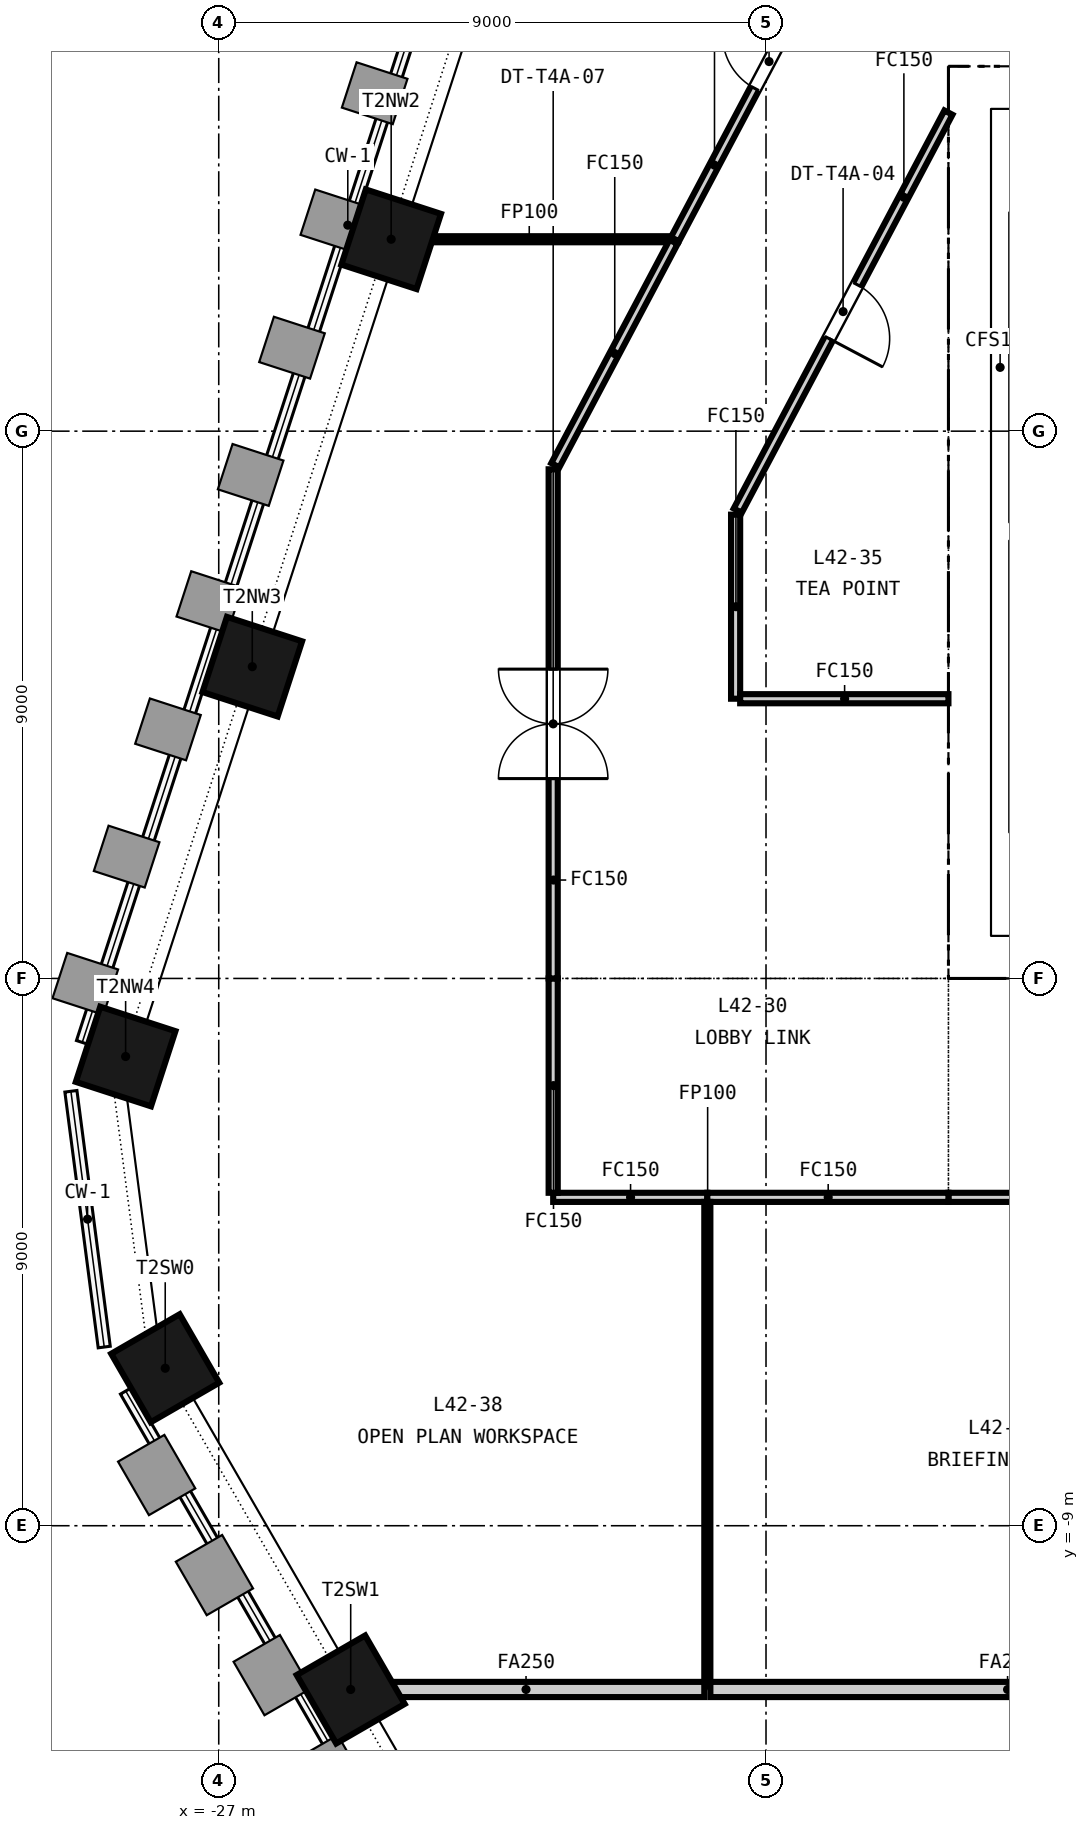
"""IFC4 building model, lengths in metres.
Left out: names, types, materials, properties, quantities, classifications, styles, units other than length and angle.
Written with IfcOpenShell. Run it as: python <this file> out.ifc"""

import sys

from ifc_helpers import new_model, si_unit, direction, frame, frame_2d, origin, origin_2d, place, context, subcontext, project, spatial, rectangle, extrude, element, fill, save


model = new_model("IFC4")
c1 = context("Model", 3, precision=1e-05, world=origin(), true_north=direction((0.0, 1.0)))
c2 = subcontext(c1, "Body", "Model", "MODEL_VIEW")
j1 = project(units=[si_unit("LENGTHUNIT", "METRE"), si_unit("PLANEANGLEUNIT", "RADIAN")], contexts=[c1])
p1 = place(None, origin())
s1 = spatial("IfcSite", under=j1, at=p1, CompositionType="ELEMENT")
p2 = place(p1, origin())
s2 = spatial("IfcBuilding", under=s1, at=p2, CompositionType="ELEMENT")
p3 = place(p2, frame((0.0, 0.0, 170.8)))
s3 = spatial("IfcBuildingStorey", under=s2, at=p3, CompositionType="ELEMENT", Elevation=170.8)
p4 = place(p3, frame((-15.0, 0.35, -0.15), z_axis=(0.0, 0.0, 1.0), x_axis=(1.0, 0.0, 0.0)))
e1 = element("IfcWall", 1, at=p4, inside=s3, PredefinedType="SOLIDWALL", context=c2, shape_type="SweptSolid", body=[
    extrude(rectangle(XDim=30.0, YDim=0.7, at=frame_2d((15.0, 0.0))), origin(), (0.0, 0.0, 1.0), 3.65),
])
p5 = place(p4, frame((5.8, 0.0, 0.15)))
e2 = element("IfcOpeningElement", 2, at=p5, cuts=e1, PredefinedType="OPENING", context=c2, shape_type="SweptSolid", body=[
    extrude(rectangle(XDim=2.4, YDim=2.4, at=frame_2d((1.2, 1.2))), frame((0.0, 0.36, 0.0), z_axis=(0.0, -1.0, 0.0), x_axis=(1.0, 0.0, 0.0)), (0.0, 0.0, 1.0), 0.72),
])
p6 = place(p4, frame((13.8, 0.0, 0.15)))
e3 = element("IfcOpeningElement", 3, at=p6, cuts=e1, PredefinedType="OPENING", context=c2, shape_type="SweptSolid", body=[
    extrude(rectangle(XDim=2.4, YDim=2.4, at=frame_2d((1.2, 1.2))), frame((0.0, 0.36, 0.0), z_axis=(0.0, -1.0, 0.0), x_axis=(1.0, 0.0, 0.0)), (0.0, 0.0, 1.0), 0.72),
])
p7 = place(p4, frame((21.8, 0.0, 0.15)))
e4 = element("IfcOpeningElement", 4, at=p7, cuts=e1, PredefinedType="OPENING", context=c2, shape_type="SweptSolid", body=[
    extrude(rectangle(XDim=2.4, YDim=2.4, at=frame_2d((1.2, 1.2))), frame((0.0, 0.36, 0.0), z_axis=(0.0, -1.0, 0.0), x_axis=(1.0, 0.0, 0.0)), (0.0, 0.0, 1.0), 0.72),
])
p8 = place(p4, frame((1.5, 0.0, 0.15)))
e5 = element("IfcOpeningElement", 5, at=p8, cuts=e1, PredefinedType="OPENING", context=c2, shape_type="SweptSolid", body=[
    extrude(rectangle(XDim=1.2, YDim=2.1, at=frame_2d((0.6, 1.05))), frame((0.0, 0.36, 0.0), z_axis=(0.0, -1.0, 0.0), x_axis=(1.0, 0.0, 0.0)), (0.0, 0.0, 1.0), 0.72),
])
p9 = place(p4, frame((27.3, 0.0, 0.15)))
e6 = element("IfcOpeningElement", 6, at=p9, cuts=e1, PredefinedType="OPENING", context=c2, shape_type="SweptSolid", body=[
    extrude(rectangle(XDim=1.2, YDim=2.1, at=frame_2d((0.6, 1.05))), frame((0.0, 0.36, 0.0), z_axis=(0.0, -1.0, 0.0), x_axis=(1.0, 0.0, 0.0)), (0.0, 0.0, 1.0), 0.72),
])
p10 = place(p3, frame((-15.0, 14.65, -0.15), z_axis=(0.0, 0.0, 1.0), x_axis=(1.0, 0.0, 0.0)))
e7 = element("IfcWall", 7, at=p10, inside=s3, PredefinedType="SOLIDWALL", context=c2, shape_type="SweptSolid", body=[
    extrude(rectangle(XDim=30.0, YDim=0.7, at=frame_2d((15.0, 0.0))), origin(), (0.0, 0.0, 1.0), 3.65),
])
p11 = place(p10, frame((9.25, 0.0, 0.15)))
e8 = element("IfcOpeningElement", 8, at=p11, cuts=e7, PredefinedType="OPENING", context=c2, shape_type="SweptSolid", body=[
    extrude(rectangle(XDim=1.5, YDim=2.1, at=frame_2d((0.75, 1.05))), frame((0.0, 0.36, 0.0), z_axis=(0.0, -1.0, 0.0), x_axis=(1.0, 0.0, 0.0)), (0.0, 0.0, 1.0), 0.72),
])
p12 = place(p10, frame((19.4, 0.0, 0.15)))
e9 = element("IfcOpeningElement", 9, at=p12, cuts=e7, PredefinedType="OPENING", context=c2, shape_type="SweptSolid", body=[
    extrude(rectangle(XDim=1.5, YDim=2.1, at=frame_2d((0.75, 1.05))), frame((0.0, 0.36, 0.0), z_axis=(0.0, -1.0, 0.0), x_axis=(1.0, 0.0, 0.0)), (0.0, 0.0, 1.0), 0.72),
])
p13 = place(p10, frame((1.5, 0.0, 0.15)))
e10 = element("IfcOpeningElement", 10, at=p13, cuts=e7, PredefinedType="OPENING", context=c2, shape_type="SweptSolid", body=[
    extrude(rectangle(XDim=1.2, YDim=2.1, at=frame_2d((0.6, 1.05))), frame((0.0, 0.36, 0.0), z_axis=(0.0, -1.0, 0.0), x_axis=(1.0, 0.0, 0.0)), (0.0, 0.0, 1.0), 0.72),
])
p14 = place(p10, frame((27.3, 0.0, 0.15)))
e11 = element("IfcOpeningElement", 11, at=p14, cuts=e7, PredefinedType="OPENING", context=c2, shape_type="SweptSolid", body=[
    extrude(rectangle(XDim=1.2, YDim=2.1, at=frame_2d((0.6, 1.05))), frame((0.0, 0.36, 0.0), z_axis=(0.0, -1.0, 0.0), x_axis=(1.0, 0.0, 0.0)), (0.0, 0.0, 1.0), 0.72),
])
p15 = place(p3, frame((-14.65, 0.7, -0.15), z_axis=(0.0, 0.0, 1.0), x_axis=(0.0, 1.0, 0.0)))
e12 = element("IfcWall", 12, at=p15, inside=s3, PredefinedType="SOLIDWALL", context=c2, shape_type="SweptSolid", body=[
    extrude(rectangle(XDim=13.6, YDim=0.7, at=frame_2d((6.8, 0.0))), origin(), (0.0, 0.0, 1.0), 3.65),
])
for number, where, z_axis, x_axis in (
    (13, (-24.164, 12.156, -0.15), (0.0, 0.0, 1.0), (-0.309, -0.951, 0.0)),
    (14, (-26.448, 5.127, -0.15), (0.0, 0.0, 1.0), (-0.309, -0.951, 0.0)),
    (15, (-28.531, -1.284, -0.15), (0.0, 0.0, 1.0), (-0.309, -0.951, 0.0)),
    (16, (-27.88, -6.41, -0.15), (0.0, 0.0, 1.0), (0.5, -0.866, 0.0)),
    (17, (-24.83, -11.693, -0.15), (0.0, 0.0, 1.0), (0.5, -0.866, 0.0)),
):
    element("IfcColumn", number, at=place(p3, frame(where, z_axis=z_axis, x_axis=x_axis)), inside=s3, PredefinedType="COLUMN", context=c2, shape_type="SweptSolid", body=[
        extrude(rectangle(XDim=1.3, YDim=1.3, at=origin_2d()), origin(), (0.0, 0.0, 1.0), 3.65),
    ])
p16 = place(p3, frame((-14.15, 0.7, 0.0), z_axis=(0.0, 0.0, 1.0), x_axis=(0.0, 1.0, 0.0)))
e18 = element("IfcWall", 18, at=p16, inside=s3, PredefinedType="SOLIDWALL", context=c2, shape_type="SweptSolid", body=[
    extrude(rectangle(XDim=13.6, YDim=0.3, at=frame_2d((6.8, 0.0))), origin(), (0.0, 0.0, 1.0), 3.5),
])
p17 = place(p3, frame((9.15, -3.6, 0.0), z_axis=(0.0, 0.0, 1.0), x_axis=(-1.0, 0.0, 0.0)))
e19 = element("IfcWall", 19, at=p17, inside=s3, PredefinedType="PARTITIONING", context=c2, shape_type="SweptSolid", body=[
    extrude(rectangle(XDim=24.15, YDim=0.15, at=frame_2d((12.075, 0.0))), origin(), (0.0, 0.0, 1.0), 2.741),
])
p18 = place(p17, frame((11.175, 0.0, 0.0)))
e20 = element("IfcOpeningElement", 20, at=p18, cuts=e19, PredefinedType="OPENING", context=c2, shape_type="SweptSolid", body=[
    extrude(rectangle(XDim=1.8, YDim=2.1, at=frame_2d((0.9, 1.05))), frame((0.0, 0.085, 0.0), z_axis=(0.0, -1.0, 0.0), x_axis=(1.0, 0.0, 0.0)), (0.0, 0.0, 1.0), 0.17),
])
p19 = place(p3, frame((-18.965, -3.6, 0.0), z_axis=(0.0, 0.0, 1.0), x_axis=(-1.0, 0.0, 0.0)))
e21 = element("IfcWall", 21, at=p19, inside=s3, PredefinedType="PARTITIONING", context=c2, shape_type="SweptSolid", body=[
    extrude(rectangle(XDim=2.535, YDim=0.15, at=frame_2d((1.268, 0.0))), origin(), (0.0, 0.0, 1.0), 2.741),
])
p20 = place(p3, frame((-15.0, -3.6, 0.0), z_axis=(0.0, 0.0, 1.0), x_axis=(-1.0, 0.0, 0.0)))
e22 = element("IfcWall", 22, at=p20, inside=s3, PredefinedType="PARTITIONING", context=c2, shape_type="SweptSolid", body=[
    extrude(rectangle(XDim=3.965, YDim=0.15, at=frame_2d((1.982, 0.0))), origin(), (0.0, 0.0, 1.0), 2.741),
])
p21 = place(p3, frame((-18.5, 7.627, 0.0), z_axis=(0.0, 0.0, 1.0), x_axis=(0.0, -1.0, 0.0)))
e23 = element("IfcWall", 23, at=p21, inside=s3, PredefinedType="PARTITIONING", context=c2, shape_type="SweptSolid", body=[
    extrude(rectangle(XDim=3.027, YDim=0.15, at=frame_2d((1.513, 0.0))), origin(), (0.0, 0.0, 1.0), 2.741),
])
p22 = place(p3, frame((-15.0, 14.239, 0.0), z_axis=(0.0, 0.0, 1.0), x_axis=(-0.467834708812, -0.88381597928, 0.0)))
e24 = element("IfcWall", 24, at=p22, inside=s3, PredefinedType="PARTITIONING", context=c2, shape_type="SweptSolid", body=[
    extrude(rectangle(XDim=7.406, YDim=0.15, at=frame_2d((3.703, 0.0))), origin(), (0.0, 0.0, 1.0), 2.741),
])
p23 = place(p22, frame((3.203, 0.0, 0.0)))
e25 = element("IfcOpeningElement", 25, at=p23, cuts=e24, PredefinedType="OPENING", context=c2, shape_type="SweptSolid", body=[
    extrude(rectangle(XDim=1.0, YDim=2.1, at=frame_2d((0.5, 1.05))), frame((0.0, 0.085, 0.0), z_axis=(0.0, -1.0, 0.0), x_axis=(1.0, 0.0, 0.0)), (0.0, 0.0, 1.0), 0.17),
])
p24 = place(p3, frame((-19.497, 12.156, 0.0), z_axis=(0.0, 0.0, 1.0), x_axis=(0.467901291368, 0.883780731593, 0.0)))
e26 = element("IfcWall", 26, at=p24, inside=s3, PredefinedType="PARTITIONING", context=c2, shape_type="SweptSolid", body=[
    extrude(rectangle(XDim=6.613, YDim=0.15, at=frame_2d((3.306, 0.0))), origin(), (0.0, 0.0, 1.0), 2.741),
])
p25 = place(p24, frame((2.806, 0.0, 0.0)))
e27 = element("IfcOpeningElement", 27, at=p25, cuts=e26, PredefinedType="OPENING", context=c2, shape_type="SweptSolid", body=[
    extrude(rectangle(XDim=1.0, YDim=2.1, at=frame_2d((0.5, 1.05))), frame((0.0, 0.085, 0.0), z_axis=(0.0, -1.0, 0.0), x_axis=(1.0, 0.0, 0.0)), (0.0, 0.0, 1.0), 0.17),
])
p26 = place(p3, frame((-24.217, 12.156, 0.0), z_axis=(0.0, 0.0, 1.0), x_axis=(1.0, 0.0, 0.0)))
e28 = element("IfcWall", 28, at=p26, inside=s3, PredefinedType="PARTITIONING", context=c2, shape_type="SweptSolid", body=[
    extrude(rectangle(XDim=4.637, YDim=0.1, at=frame_2d((2.318, 0.0))), origin(), (0.0, 0.0, 1.0), 2.741),
])
p27 = place(p3, frame((-18.425, 4.6, 0.0), z_axis=(0.0, 0.0, 1.0), x_axis=(1.0, 0.0, 0.0)))
e29 = element("IfcWall", 29, at=p27, inside=s3, PredefinedType="PARTITIONING", context=c2, shape_type="SweptSolid", body=[
    extrude(rectangle(XDim=3.425, YDim=0.15, at=frame_2d((1.712, 0.0))), origin(), (0.0, 0.0, 1.0), 2.741),
])
p28 = place(p3, frame((-21.5, -3.525, 0.0), z_axis=(0.0, 0.0, 1.0), x_axis=(0.0, 1.0, 0.0)))
e30 = element("IfcWall", 30, at=p28, inside=s3, PredefinedType="PARTITIONING", context=c2, shape_type="SweptSolid", body=[
    extrude(rectangle(XDim=3.525, YDim=0.15, at=frame_2d((1.762, 0.0))), origin(), (0.0, 0.0, 1.0), 2.741),
])
p29 = place(p3, frame((-21.5, 0.0, 0.0), z_axis=(0.0, 0.0, 1.0), x_axis=(0.0, 1.0, 0.0)))
e31 = element("IfcWall", 31, at=p29, inside=s3, PredefinedType="PARTITIONING", context=c2, shape_type="SweptSolid", body=[
    extrude(rectangle(XDim=8.373, YDim=0.15, at=frame_2d((4.187, 0.0))), origin(), (0.0, 0.0, 1.0), 2.741),
])
p30 = place(p29, frame((3.287, 0.0, 0.0)))
e32 = element("IfcOpeningElement", 32, at=p30, cuts=e31, PredefinedType="OPENING", context=c2, shape_type="SweptSolid", body=[
    extrude(rectangle(XDim=1.8, YDim=2.1, at=frame_2d((0.9, 1.05))), frame((0.0, 0.085, 0.0), z_axis=(0.0, -1.0, 0.0), x_axis=(1.0, 0.0, 0.0)), (0.0, 0.0, 1.0), 0.17),
])
p31 = place(p3, frame((-21.465, 8.439, 0.0), z_axis=(0.0, 0.0, 1.0), x_axis=(0.467890419772, 0.883786487272, 0.0)))
e33 = element("IfcWall", 33, at=p31, inside=s3, PredefinedType="PARTITIONING", context=c2, shape_type="SweptSolid", body=[
    extrude(rectangle(XDim=4.156, YDim=0.15, at=frame_2d((2.078, 0.0))), origin(), (0.0, 0.0, 1.0), 2.741),
])
p32 = place(p3, frame((-18.965, -11.618, 0.0), z_axis=(0.0, 0.0, 1.0), x_axis=(0.0, 1.0, 0.0)))
e34 = element("IfcWall", 34, at=p32, inside=s3, PredefinedType="PARTITIONING", context=c2, shape_type="SweptSolid", body=[
    extrude(rectangle(XDim=7.943, YDim=0.1, at=frame_2d((3.971, 0.0))), origin(), (0.0, 0.0, 1.0), 2.741),
])
p33 = place(p3, frame((-24.888, -11.693, 0.0), z_axis=(0.0, 0.0, 1.0), x_axis=(1.0, 0.0, 0.0)))
e35 = element("IfcWall", 35, at=p33, inside=s3, PredefinedType="PARTITIONING", context=c2, shape_type="SweptSolid", body=[
    extrude(rectangle(XDim=5.873, YDim=0.25, at=frame_2d((2.937, 0.0))), origin(), (0.0, 0.0, 1.0), 2.741),
])
p34 = place(p3, frame((-18.915, -11.693, 0.0), z_axis=(0.0, 0.0, 1.0), x_axis=(1.0, 0.0, 0.0)))
e36 = element("IfcWall", 36, at=p34, inside=s3, PredefinedType="PARTITIONING", context=c2, shape_type="SweptSolid", body=[
    extrude(rectangle(XDim=9.765, YDim=0.25, at=frame_2d((4.883, 0.0))), origin(), (0.0, 0.0, 1.0), 2.741),
])
p35 = place(p25, origin())
e37 = element("IfcDoor", 37, at=p35, inside=s3, OperationType="SINGLE_SWING_RIGHT", PredefinedType="DOOR", context=c2, shape_type="SweptSolid", body=[
    extrude(rectangle(XDim=1.0, YDim=2.1, at=frame_2d((0.5, 1.05))), frame((0.0, 0.025, 0.0), z_axis=(0.0, -1.0, 0.0), x_axis=(1.0, 0.0, 0.0)), (0.0, 0.0, 1.0), 0.05),
])
fill(e27, e37)
p36 = place(p23, origin())
e38 = element("IfcDoor", 38, at=p36, inside=s3, OperationType="SINGLE_SWING_RIGHT", PredefinedType="DOOR", context=c2, shape_type="SweptSolid", body=[
    extrude(rectangle(XDim=1.0, YDim=2.1, at=frame_2d((0.5, 1.05))), frame((0.0, 0.025, 0.0), z_axis=(0.0, -1.0, 0.0), x_axis=(1.0, 0.0, 0.0)), (0.0, 0.0, 1.0), 0.05),
])
fill(e25, e38)
p37 = place(p30, origin())
e39 = element("IfcDoor", 39, at=p37, inside=s3, OperationType="DOUBLE_DOOR_DOUBLE_SWING", PredefinedType="DOOR", context=c2, shape_type="SweptSolid", body=[
    extrude(rectangle(XDim=1.8, YDim=2.1, at=frame_2d((0.9, 1.05))), frame((0.0, 0.025, 0.0), z_axis=(0.0, -1.0, 0.0), x_axis=(1.0, 0.0, 0.0)), (0.0, 0.0, 1.0), 0.05),
])
fill(e32, e39)
save(model, sys.argv[1])
